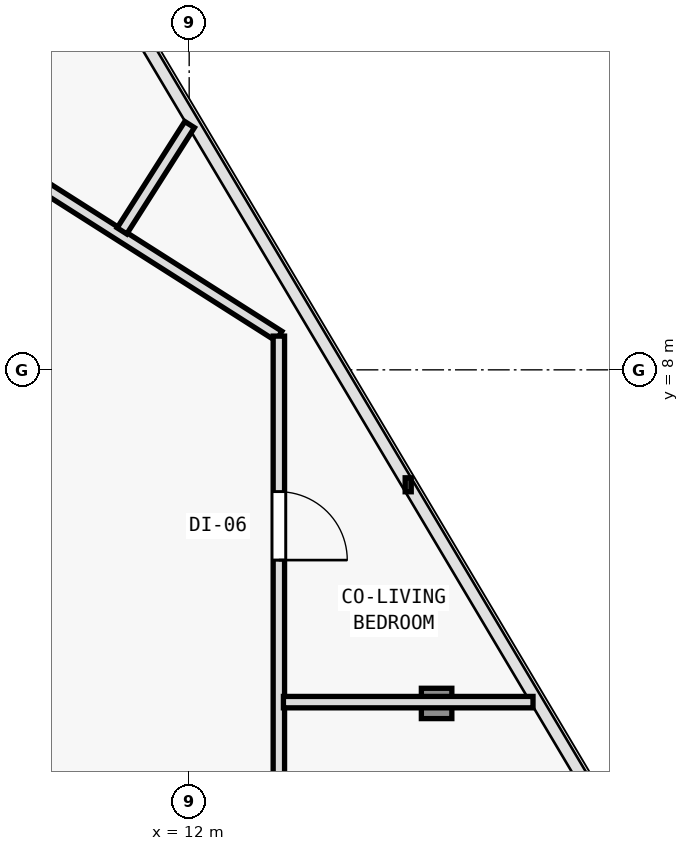
"""IFC4 building model, lengths in metres.
Left out: names, types, materials, properties, quantities, classifications, styles, units other than length and angle.
Written with IfcOpenShell. Run it as: python <this file> out.ifc"""

import sys

from ifc_helpers import new_model, si_unit, direction, frame, frame_2d, origin, origin_2d, place, context, subcontext, project, spatial, rectangle, i_section, extrude, element, fill, save


model = new_model("IFC4")
c1 = context("Model", 3, precision=1e-05, world=origin(), true_north=direction((0.0, 1.0)))
c2 = subcontext(c1, "Body", "Model", "MODEL_VIEW")
j1 = project(units=[si_unit("LENGTHUNIT", "METRE"), si_unit("PLANEANGLEUNIT", "RADIAN")], contexts=[c1])
p1 = place(None, origin())
s1 = spatial("IfcSite", under=j1, at=p1, CompositionType="ELEMENT")
p2 = place(p1, origin())
s2 = spatial("IfcBuilding", under=s1, at=p2, CompositionType="ELEMENT")
p3 = place(p2, frame((0.0, 0.0, 178.2)))
s3 = spatial("IfcBuildingStorey", under=s2, at=p3, CompositionType="ELEMENT", Elevation=178.2)
p4 = place(p3, frame((15.255, 3.611, 0.006), z_axis=(-0.018907314261, 0.009589680974, 0.999775250487), x_axis=(-0.452339157861, -0.891845999187, 0.0)))
e1 = element("IfcColumn", 1, at=p4, inside=s3, PredefinedType="COLUMN", context=c2, shape_type="SweptSolid", body=[
    extrude(i_section(OverallWidth=0.401, OverallDepth=0.399, WebThickness=0.016, FlangeThickness=0.025, FilletRadius=0.015, at=origin_2d()), origin(), (0.0, 0.0, 1.0), 3.59),
])
p5 = place(p3, frame((7.023, 12.36, 0.0), z_axis=(0.0, 0.0, 1.0), x_axis=(0.84376480085, -0.536713108511, 0.0)))
e2 = element("IfcWall", 2, at=p5, inside=s3, PredefinedType="PARTITIONING", context=c2, shape_type="SweptSolid", body=[
    extrude(rectangle(XDim=7.297, YDim=0.15, at=frame_2d((3.648, 0.0))), origin(), (0.0, 0.0, 1.0), 2.725),
])
p6 = place(p5, frame((2.44, 0.0, 0.0)))
e3 = element("IfcOpeningElement", 3, at=p6, cuts=e2, PredefinedType="OPENING", context=c2, shape_type="SweptSolid", body=[
    extrude(rectangle(XDim=0.9, YDim=2.1, at=frame_2d((0.45, 1.05))), frame((0.0, 0.085, 0.0), z_axis=(0.0, -1.0, 0.0), x_axis=(1.0, 0.0, 0.0)), (0.0, 0.0, 1.0), 0.17),
])
p7 = place(p3, frame((13.18, 8.444, 0.0), z_axis=(0.0, 0.0, 1.0), x_axis=(0.0, -1.0, 0.0)))
e4 = element("IfcWall", 4, at=p7, inside=s3, PredefinedType="PARTITIONING", context=c2, shape_type="SweptSolid", body=[
    extrude(rectangle(XDim=20.004, YDim=0.15, at=frame_2d((10.002, 0.0))), origin(), (0.0, 0.0, 1.0), 2.825),
])
p8 = place(p7, frame((15.619, 0.0, 0.0)))
e5 = element("IfcOpeningElement", 5, at=p8, cuts=e4, PredefinedType="OPENING", context=c2, shape_type="SweptSolid", body=[
    extrude(rectangle(XDim=0.9, YDim=2.1, at=frame_2d((0.45, 1.05))), frame((0.0, 0.085, 0.0), z_axis=(0.0, -1.0, 0.0), x_axis=(1.0, 0.0, 0.0)), (0.0, 0.0, 1.0), 0.17),
])
p9 = place(p7, frame((8.115, 0.0, 0.0)))
e6 = element("IfcOpeningElement", 6, at=p9, cuts=e4, PredefinedType="OPENING", context=c2, shape_type="SweptSolid", body=[
    extrude(rectangle(XDim=0.9, YDim=2.1, at=frame_2d((0.45, 1.05))), frame((0.0, 0.085, 0.0), z_axis=(0.0, -1.0, 0.0), x_axis=(1.0, 0.0, 0.0)), (0.0, 0.0, 1.0), 0.17),
])
p10 = place(p7, frame((2.047, 0.0, 0.0)))
e7 = element("IfcOpeningElement", 7, at=p10, cuts=e4, PredefinedType="OPENING", context=c2, shape_type="SweptSolid", body=[
    extrude(rectangle(XDim=0.9, YDim=2.1, at=frame_2d((0.45, 1.05))), frame((0.0, 0.085, 0.0), z_axis=(0.0, -1.0, 0.0), x_axis=(1.0, 0.0, 0.0)), (0.0, 0.0, 1.0), 0.17),
])
p11 = place(p3, frame((13.24, 3.628, 0.0), z_axis=(0.0, 0.0, 1.0), x_axis=(1.0, 0.0, 0.0)))
e8 = element("IfcWall", 8, at=p11, inside=s3, PredefinedType="PARTITIONING", context=c2, shape_type="SweptSolid", body=[
    extrude(rectangle(XDim=3.284, YDim=0.15, at=frame_2d((1.642, 0.0))), origin(), (0.0, 0.0, 1.0), 2.935),
])
p12 = place(p3, frame((11.116, 9.828, 0.0), z_axis=(0.0, 0.0, 1.0), x_axis=(0.536732563691, 0.843752425226, 0.0)))
e9 = element("IfcWall", 9, at=p12, inside=s3, PredefinedType="PARTITIONING", context=c2, shape_type="SweptSolid", body=[
    extrude(rectangle(XDim=1.658, YDim=0.15, at=frame_2d((0.829, 0.0))), origin(), (0.0, 0.0, 1.0), 2.935),
])
p13 = place(p10, origin())
e10 = element("IfcDoor", 10, at=p13, inside=s3, OperationType="SINGLE_SWING_RIGHT", PredefinedType="DOOR", context=c2, shape_type="SweptSolid", body=[
    extrude(rectangle(XDim=0.9, YDim=2.1, at=frame_2d((0.45, 1.05))), frame((0.0, 0.025, 0.0), z_axis=(0.0, -1.0, 0.0), x_axis=(1.0, 0.0, 0.0)), (0.0, 0.0, 1.0), 0.05),
])
fill(e7, e10)
save(model, sys.argv[1])
